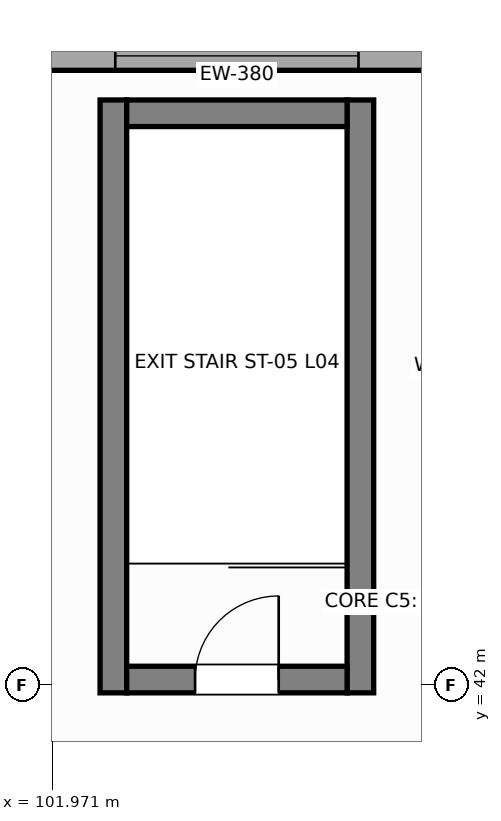
"""IFC4 building model, lengths in metres.
Left out: names, types, materials, properties, quantities, classifications, styles, units other than length and angle.
Written with IfcOpenShell. Run it as: python <this file> out.ifc"""

import sys

from ifc_helpers import new_model, si_unit, direction, frame, frame_2d, origin, place, context, subcontext, project, spatial, rectangle, extrude, element, fill, save


model = new_model("IFC4")
c1 = context("Model", 3, precision=1e-05, world=origin(), true_north=direction((0.0, 1.0)))
c2 = subcontext(c1, "Body", "Model", "MODEL_VIEW")
j1 = project(units=[si_unit("LENGTHUNIT", "METRE"), si_unit("PLANEANGLEUNIT", "RADIAN")], contexts=[c1])
p1 = place(None, origin())
s1 = spatial("IfcSite", under=j1, at=p1, CompositionType="ELEMENT")
p2 = place(p1, origin())
s2 = spatial("IfcBuilding", under=s1, at=p2, CompositionType="ELEMENT")
p3 = place(p2, frame((0.0, 0.0, 17.4)))
s3 = spatial("IfcBuildingStorey", under=s2, at=p3, CompositionType="ELEMENT", Elevation=17.4)
for number, where, z_axis, x_axis in (
    (1, (102.775, 41.9, 0.0), (0.0, 0.0, 1.0), (0.0, 1.0, 0.0)),
    (2, (106.025, 41.9, 0.0), (0.0, 0.0, 1.0), (0.0, 1.0, 0.0)),
):
    element("IfcWall", number, at=place(p3, frame(where, z_axis=z_axis, x_axis=x_axis)), inside=s3, PredefinedType="SHEAR", context=c2, shape_type="SweptSolid", body=[
        extrude(rectangle(XDim=7.8, YDim=0.35, at=frame_2d((3.9, 0.0))), origin(), (0.0, 0.0, 1.0), 4.0),
    ])
p4 = place(p3, frame((102.95, 49.525, 0.0), z_axis=(0.0, 0.0, 1.0), x_axis=(1.0, 0.0, 0.0)))
e3 = element("IfcWall", 3, at=p4, inside=s3, PredefinedType="SHEAR", context=c2, shape_type="SweptSolid", body=[
    extrude(rectangle(XDim=2.9, YDim=0.35, at=frame_2d((1.45, 0.0))), origin(), (0.0, 0.0, 1.0), 4.0),
])
p5 = place(p3, frame((102.95, 42.075, 0.0), z_axis=(0.0, 0.0, 1.0), x_axis=(1.0, 0.0, 0.0)))
e4 = element("IfcWall", 4, at=p5, inside=s3, PredefinedType="SHEAR", context=c2, shape_type="SweptSolid", body=[
    extrude(rectangle(XDim=2.9, YDim=0.35, at=frame_2d((1.45, 0.0))), origin(), (0.0, 0.0, 1.0), 4.0),
])
p6 = place(p5, frame((0.9, 0.0, 0.0)))
e5 = element("IfcOpeningElement", 5, at=p6, cuts=e4, PredefinedType="OPENING", context=c2, shape_type="SweptSolid", body=[
    extrude(rectangle(XDim=1.1, YDim=2.15, at=frame_2d((0.55, 1.075))), frame((0.0, 0.185, 0.0), z_axis=(0.0, -1.0, 0.0), x_axis=(1.0, 0.0, 0.0)), (0.0, 0.0, 1.0), 0.37),
])
p7 = place(p3, frame((100.8, 50.28, 0.0), z_axis=(0.0, 0.0, 1.0), x_axis=(1.0, 0.0, 0.0)))
e6 = element("IfcWall", 6, at=p7, inside=s3, PredefinedType="SOLIDWALL", context=c2, shape_type="SweptSolid", body=[
    extrude(rectangle(XDim=7.2, YDim=0.38, at=frame_2d((3.6, 0.0))), origin(), (0.0, 0.0, 1.0), 3.529),
])
p8 = place(p7, frame((2.0, 0.0, 0.95)))
e7 = element("IfcOpeningElement", 7, at=p8, cuts=e6, PredefinedType="OPENING", context=c2, shape_type="SweptSolid", body=[
    extrude(rectangle(XDim=3.2, YDim=1.75, at=frame_2d((1.6, 0.875))), frame((0.0, 0.2, 0.0), z_axis=(0.0, -1.0, 0.0), x_axis=(1.0, 0.0, 0.0)), (0.0, 0.0, 1.0), 0.4),
])
p9 = place(p6, origin())
e8 = element("IfcDoor", 8, at=p9, inside=s3, OperationType="SINGLE_SWING_RIGHT", PredefinedType="DOOR", context=c2, shape_type="SweptSolid", body=[
    extrude(rectangle(XDim=1.1, YDim=2.15, at=frame_2d((0.55, 1.075))), frame((0.0, 0.025, 0.0), z_axis=(0.0, -1.0, 0.0), x_axis=(1.0, 0.0, 0.0)), (0.0, 0.0, 1.0), 0.05),
])
fill(e5, e8)
p10 = place(p8, origin())
e9 = element("IfcWindow", 9, at=p10, inside=s3, PartitioningType="SINGLE_PANEL", PredefinedType="WINDOW", context=c2, shape_type="SweptSolid", body=[
    extrude(rectangle(XDim=3.2, YDim=1.75, at=frame_2d((1.6, 0.875))), frame((0.0, 0.03, 0.0), z_axis=(0.0, -1.0, 0.0), x_axis=(1.0, 0.0, 0.0)), (0.0, 0.0, 1.0), 0.06),
])
fill(e7, e9)
save(model, sys.argv[1])
